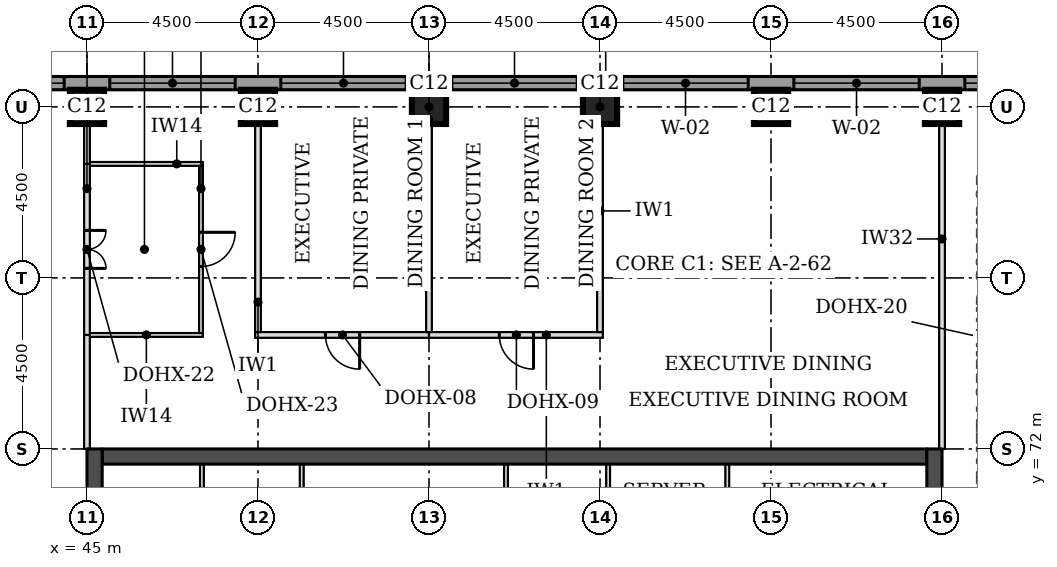
"""IFC4 building model, lengths in metres.
Left out: names, types, materials, properties, quantities, classifications, styles, units other than length and angle.
Written with IfcOpenShell. Run it as: python <this file> out.ifc"""

import sys

from ifc_helpers import new_model, si_unit, direction, frame, frame_2d, origin, origin_2d, place, context, subcontext, project, spatial, rectangle, extrude, element, fill, save


model = new_model("IFC4")
c1 = context("Model", 3, precision=1e-05, world=origin(), true_north=direction((0.0, 1.0)))
c2 = subcontext(c1, "Body", "Model", "MODEL_VIEW")
j1 = project(units=[si_unit("LENGTHUNIT", "METRE"), si_unit("PLANEANGLEUNIT", "RADIAN")], contexts=[c1])
p1 = place(None, origin())
s1 = spatial("IfcSite", under=j1, at=p1, CompositionType="ELEMENT")
p2 = place(p1, origin())
s2 = spatial("IfcBuilding", under=s1, at=p2, CompositionType="ELEMENT")
p3 = place(p2, frame((0.0, 0.0, 256.3)))
s3 = spatial("IfcBuildingStorey", under=s2, at=p3, CompositionType="ELEMENT", Elevation=256.3)
for number, where, z_axis, x_axis in (
    (1, (45.0, 81.0, 0.0), (0.0, 0.0, 1.0), (1.0, 0.0, 0.0)),
    (2, (49.5, 81.0, 0.0), (0.0, 0.0, 1.0), (1.0, 0.0, 0.0)),
    (3, (54.0, 81.0, 0.0), (0.0, 0.0, 1.0), (1.0, 0.0, 0.0)),
    (4, (58.5, 81.0, 0.0), (0.0, 0.0, 1.0), (1.0, 0.0, 0.0)),
    (5, (63.0, 81.0, 0.0), (0.0, 0.0, 1.0), (1.0, 0.0, 0.0)),
    (6, (67.5, 81.0, 0.0), (0.0, 0.0, 1.0), (1.0, 0.0, 0.0)),
):
    element("IfcColumn", number, at=place(p3, frame(where, z_axis=z_axis, x_axis=x_axis)), inside=s3, PredefinedType="COLUMN", context=c2, shape_type="SweptSolid", body=[
        extrude(rectangle(XDim=0.9, YDim=0.9, at=origin_2d()), origin(), (0.0, 0.0, 1.0), 3.7),
    ])
p4 = place(p3, frame((45.4, 71.8, 0.0), z_axis=(0.0, 0.0, 1.0), x_axis=(1.0, 0.0, 0.0)))
e7 = element("IfcWall", 7, at=p4, inside=s3, PredefinedType="SHEAR", context=c2, shape_type="SweptSolid", body=[
    extrude(rectangle(XDim=21.7, YDim=0.4, at=frame_2d((10.85, 0.0))), origin(), (0.0, 0.0, 1.0), 3.7),
])
p5 = place(p3, frame((45.2, 49.5, 0.0), z_axis=(0.0, 0.0, 1.0), x_axis=(0.0, 1.0, 0.0)))
e8 = element("IfcWall", 8, at=p5, inside=s3, PredefinedType="SHEAR", context=c2, shape_type="SweptSolid", body=[
    extrude(rectangle(XDim=22.5, YDim=0.4, at=frame_2d((11.25, 0.0))), origin(), (0.0, 0.0, 1.0), 3.7),
])
p6 = place(p5, frame((4.2, 0.0, 0.0)))
e9 = element("IfcOpeningElement", 9, at=p6, cuts=e8, PredefinedType="OPENING", context=c2, shape_type="SweptSolid", body=[
    extrude(rectangle(XDim=1.8, YDim=2.1, at=frame_2d((0.9, 1.05))), frame((0.0, 0.21, 0.0), z_axis=(0.0, -1.0, 0.0), x_axis=(1.0, 0.0, 0.0)), (0.0, 0.0, 1.0), 0.42),
])
p7 = place(p5, frame((6.9, 0.0, 0.0)))
e10 = element("IfcOpeningElement", 10, at=p7, cuts=e8, PredefinedType="OPENING", context=c2, shape_type="SweptSolid", body=[
    extrude(rectangle(XDim=1.1, YDim=2.1, at=frame_2d((0.55, 1.05))), frame((0.0, 0.21, 0.0), z_axis=(0.0, -1.0, 0.0), x_axis=(1.0, 0.0, 0.0)), (0.0, 0.0, 1.0), 0.42),
])
p8 = place(p5, frame((13.6, 0.0, 0.0)))
e11 = element("IfcOpeningElement", 11, at=p8, cuts=e8, PredefinedType="OPENING", context=c2, shape_type="SweptSolid", body=[
    extrude(rectangle(XDim=1.1, YDim=2.1, at=frame_2d((0.55, 1.05))), frame((0.0, 0.21, 0.0), z_axis=(0.0, -1.0, 0.0), x_axis=(1.0, 0.0, 0.0)), (0.0, 0.0, 1.0), 0.42),
])
p9 = place(p5, frame((16.5, 0.0, 0.0)))
e12 = element("IfcOpeningElement", 12, at=p9, cuts=e8, PredefinedType="OPENING", context=c2, shape_type="SweptSolid", body=[
    extrude(rectangle(XDim=1.8, YDim=2.1, at=frame_2d((0.9, 1.05))), frame((0.0, 0.21, 0.0), z_axis=(0.0, -1.0, 0.0), x_axis=(1.0, 0.0, 0.0)), (0.0, 0.0, 1.0), 0.42),
])
p10 = place(p3, frame((67.3, 49.5, 0.0), z_axis=(0.0, 0.0, 1.0), x_axis=(0.0, 1.0, 0.0)))
e13 = element("IfcWall", 13, at=p10, inside=s3, PredefinedType="SHEAR", context=c2, shape_type="SweptSolid", body=[
    extrude(rectangle(XDim=22.5, YDim=0.4, at=frame_2d((11.25, 0.0))), origin(), (0.0, 0.0, 1.0), 3.7),
])
p11 = place(p10, frame((4.2, 0.0, 0.0)))
e14 = element("IfcOpeningElement", 14, at=p11, cuts=e13, PredefinedType="OPENING", context=c2, shape_type="SweptSolid", body=[
    extrude(rectangle(XDim=1.8, YDim=2.1, at=frame_2d((0.9, 1.05))), frame((0.0, 0.21, 0.0), z_axis=(0.0, -1.0, 0.0), x_axis=(1.0, 0.0, 0.0)), (0.0, 0.0, 1.0), 0.42),
])
p12 = place(p10, frame((6.9, 0.0, 0.0)))
e15 = element("IfcOpeningElement", 15, at=p12, cuts=e13, PredefinedType="OPENING", context=c2, shape_type="SweptSolid", body=[
    extrude(rectangle(XDim=1.1, YDim=2.1, at=frame_2d((0.55, 1.05))), frame((0.0, 0.21, 0.0), z_axis=(0.0, -1.0, 0.0), x_axis=(1.0, 0.0, 0.0)), (0.0, 0.0, 1.0), 0.42),
])
p13 = place(p10, frame((13.6, 0.0, 0.0)))
e16 = element("IfcOpeningElement", 16, at=p13, cuts=e13, PredefinedType="OPENING", context=c2, shape_type="SweptSolid", body=[
    extrude(rectangle(XDim=1.1, YDim=2.1, at=frame_2d((0.55, 1.05))), frame((0.0, 0.21, 0.0), z_axis=(0.0, -1.0, 0.0), x_axis=(1.0, 0.0, 0.0)), (0.0, 0.0, 1.0), 0.42),
])
p14 = place(p10, frame((16.5, 0.0, 0.0)))
e17 = element("IfcOpeningElement", 17, at=p14, cuts=e13, PredefinedType="OPENING", context=c2, shape_type="SweptSolid", body=[
    extrude(rectangle(XDim=1.8, YDim=2.1, at=frame_2d((0.9, 1.05))), frame((0.0, 0.21, 0.0), z_axis=(0.0, -1.0, 0.0), x_axis=(1.0, 0.0, 0.0)), (0.0, 0.0, 1.0), 0.42),
])
p15 = place(p3, frame((72.331, 81.625, 0.0), z_axis=(0.0, 0.0, 1.0), x_axis=(-1.0, 0.0, 0.0)))
e18 = element("IfcWall", 18, at=p15, inside=s3, PredefinedType="STANDARD", context=c2, shape_type="SweptSolid", body=[
    extrude(rectangle(XDim=32.163, YDim=0.35, at=frame_2d((16.081, 0.0))), origin(), (0.0, 0.0, 1.0), 3.525),
])
p16 = place(p15, frame((0.931, 0.0, 0.9)))
e19 = element("IfcOpeningElement", 19, at=p16, cuts=e18, PredefinedType="OPENING", context=c2, shape_type="SweptSolid", body=[
    extrude(rectangle(XDim=3.3, YDim=1.9, at=frame_2d((1.65, 0.95))), frame((0.0, 0.185, 0.0), z_axis=(0.0, -1.0, 0.0), x_axis=(1.0, 0.0, 0.0)), (0.0, 0.0, 1.0), 0.37),
])
p17 = place(p15, frame((5.431, 0.0, 0.9)))
e20 = element("IfcOpeningElement", 20, at=p17, cuts=e18, PredefinedType="OPENING", context=c2, shape_type="SweptSolid", body=[
    extrude(rectangle(XDim=3.3, YDim=1.9, at=frame_2d((1.65, 0.95))), frame((0.0, 0.185, 0.0), z_axis=(0.0, -1.0, 0.0), x_axis=(1.0, 0.0, 0.0)), (0.0, 0.0, 1.0), 0.37),
])
p18 = place(p15, frame((9.931, 0.0, 0.9)))
e21 = element("IfcOpeningElement", 21, at=p18, cuts=e18, PredefinedType="OPENING", context=c2, shape_type="SweptSolid", body=[
    extrude(rectangle(XDim=3.3, YDim=1.9, at=frame_2d((1.65, 0.95))), frame((0.0, 0.185, 0.0), z_axis=(0.0, -1.0, 0.0), x_axis=(1.0, 0.0, 0.0)), (0.0, 0.0, 1.0), 0.37),
])
p19 = place(p15, frame((14.431, 0.0, 0.9)))
e22 = element("IfcOpeningElement", 22, at=p19, cuts=e18, PredefinedType="OPENING", context=c2, shape_type="SweptSolid", body=[
    extrude(rectangle(XDim=3.3, YDim=1.9, at=frame_2d((1.65, 0.95))), frame((0.0, 0.185, 0.0), z_axis=(0.0, -1.0, 0.0), x_axis=(1.0, 0.0, 0.0)), (0.0, 0.0, 1.0), 0.37),
])
p20 = place(p15, frame((18.931, 0.0, 0.9)))
e23 = element("IfcOpeningElement", 23, at=p20, cuts=e18, PredefinedType="OPENING", context=c2, shape_type="SweptSolid", body=[
    extrude(rectangle(XDim=3.3, YDim=1.9, at=frame_2d((1.65, 0.95))), frame((0.0, 0.185, 0.0), z_axis=(0.0, -1.0, 0.0), x_axis=(1.0, 0.0, 0.0)), (0.0, 0.0, 1.0), 0.37),
])
p21 = place(p15, frame((23.431, 0.0, 0.9)))
e24 = element("IfcOpeningElement", 24, at=p21, cuts=e18, PredefinedType="OPENING", context=c2, shape_type="SweptSolid", body=[
    extrude(rectangle(XDim=3.3, YDim=1.9, at=frame_2d((1.65, 0.95))), frame((0.0, 0.185, 0.0), z_axis=(0.0, -1.0, 0.0), x_axis=(1.0, 0.0, 0.0)), (0.0, 0.0, 1.0), 0.37),
])
p22 = place(p15, frame((27.931, 0.0, 0.9)))
e25 = element("IfcOpeningElement", 25, at=p22, cuts=e18, PredefinedType="OPENING", context=c2, shape_type="SweptSolid", body=[
    extrude(rectangle(XDim=3.3, YDim=1.9, at=frame_2d((1.65, 0.95))), frame((0.0, 0.185, 0.0), z_axis=(0.0, -1.0, 0.0), x_axis=(1.0, 0.0, 0.0)), (0.0, 0.0, 1.0), 0.37),
])
p23 = place(p3, frame((45.075, 75.0, 0.0), z_axis=(0.0, 0.0, 1.0), x_axis=(1.0, 0.0, 0.0)))
e26 = element("IfcWall", 26, at=p23, inside=s3, PredefinedType="PARTITIONING", context=c2, shape_type="SweptSolid", body=[
    extrude(rectangle(XDim=2.975, YDim=0.1, at=frame_2d((1.488, 0.0))), origin(), (0.0, 0.0, 1.0), 3.55),
])
p24 = place(p3, frame((49.425, 75.0, 0.0), z_axis=(0.0, 0.0, 1.0), x_axis=(1.0, 0.0, 0.0)))
e27 = element("IfcWall", 27, at=p24, inside=s3, PredefinedType="PARTITIONING", context=c2, shape_type="SweptSolid", body=[
    extrude(rectangle(XDim=4.575, YDim=0.15, at=frame_2d((2.288, 0.0))), origin(), (0.0, 0.0, 1.0), 3.55),
])
p25 = place(p24, frame((1.85, 0.0, 0.0)))
e28 = element("IfcOpeningElement", 28, at=p25, cuts=e27, PredefinedType="OPENING", context=c2, shape_type="SweptSolid", body=[
    extrude(rectangle(XDim=0.9, YDim=2.1, at=frame_2d((0.45, 1.05))), frame((0.0, 0.085, 0.0), z_axis=(0.0, -1.0, 0.0), x_axis=(1.0, 0.0, 0.0)), (0.0, 0.0, 1.0), 0.17),
])
p26 = place(p3, frame((54.0, 75.0, 0.0), z_axis=(0.0, 0.0, 1.0), x_axis=(1.0, 0.0, 0.0)))
e29 = element("IfcWall", 29, at=p26, inside=s3, PredefinedType="PARTITIONING", context=c2, shape_type="SweptSolid", body=[
    extrude(rectangle(XDim=4.575, YDim=0.15, at=frame_2d((2.288, 0.0))), origin(), (0.0, 0.0, 1.0), 3.55),
])
p27 = place(p26, frame((1.85, 0.0, 0.0)))
e30 = element("IfcOpeningElement", 30, at=p27, cuts=e29, PredefinedType="OPENING", context=c2, shape_type="SweptSolid", body=[
    extrude(rectangle(XDim=0.9, YDim=2.1, at=frame_2d((0.45, 1.05))), frame((0.0, 0.085, 0.0), z_axis=(0.0, -1.0, 0.0), x_axis=(1.0, 0.0, 0.0)), (0.0, 0.0, 1.0), 0.17),
])
p28 = place(p3, frame((45.075, 79.5, 0.0), z_axis=(0.0, 0.0, 1.0), x_axis=(1.0, 0.0, 0.0)))
e31 = element("IfcWall", 31, at=p28, inside=s3, PredefinedType="PARTITIONING", context=c2, shape_type="SweptSolid", body=[
    extrude(rectangle(XDim=2.975, YDim=0.1, at=frame_2d((1.488, 0.0))), origin(), (0.0, 0.0, 1.0), 3.55),
])
p29 = place(p3, frame((45.0, 72.0, 0.0), z_axis=(0.0, 0.0, 1.0), x_axis=(0.0, 1.0, 0.0)))
e32 = element("IfcWall", 32, at=p29, inside=s3, PredefinedType="PARTITIONING", context=c2, shape_type="SweptSolid", body=[
    extrude(rectangle(XDim=3.0, YDim=0.15, at=frame_2d((1.5, 0.0))), origin(), (0.0, 0.0, 1.0), 3.022),
])
p30 = place(p3, frame((67.5, 72.0, 0.0), z_axis=(0.0, 0.0, 1.0), x_axis=(0.0, 1.0, 0.0)))
e33 = element("IfcWall", 33, at=p30, inside=s3, PredefinedType="PARTITIONING", context=c2, shape_type="SweptSolid", body=[
    extrude(rectangle(XDim=9.45, YDim=0.15, at=frame_2d((4.725, 0.0))), origin(), (0.0, 0.0, 1.0), 3.022),
])
p31 = place(p3, frame((45.0, 75.0, 0.0), z_axis=(0.0, 0.0, 1.0), x_axis=(0.0, 1.0, 0.0)))
e34 = element("IfcWall", 34, at=p31, inside=s3, PredefinedType="PARTITIONING", context=c2, shape_type="SweptSolid", body=[
    extrude(rectangle(XDim=4.5, YDim=0.15, at=frame_2d((2.25, 0.0))), origin(), (0.0, 0.0, 1.0), 3.022),
])
p32 = place(p31, frame((1.75, 0.0, 0.0)))
e35 = element("IfcOpeningElement", 35, at=p32, cuts=e34, PredefinedType="OPENING", context=c2, shape_type="SweptSolid", body=[
    extrude(rectangle(XDim=1.0, YDim=2.1, at=frame_2d((0.5, 1.05))), frame((0.0, 0.085, 0.0), z_axis=(0.0, -1.0, 0.0), x_axis=(1.0, 0.0, 0.0)), (0.0, 0.0, 1.0), 0.17),
])
p33 = place(p3, frame((48.0, 75.05, 0.0), z_axis=(0.0, 0.0, 1.0), x_axis=(0.0, 1.0, 0.0)))
e36 = element("IfcWall", 36, at=p33, inside=s3, PredefinedType="PARTITIONING", context=c2, shape_type="SweptSolid", body=[
    extrude(rectangle(XDim=4.4, YDim=0.1, at=frame_2d((2.2, 0.0))), origin(), (0.0, 0.0, 1.0), 3.55),
])
p34 = place(p33, frame((1.75, 0.0, 0.0)))
e37 = element("IfcOpeningElement", 37, at=p34, cuts=e36, PredefinedType="OPENING", context=c2, shape_type="SweptSolid", body=[
    extrude(rectangle(XDim=0.9, YDim=2.1, at=frame_2d((0.45, 1.05))), frame((0.0, 0.06, 0.0), z_axis=(0.0, -1.0, 0.0), x_axis=(1.0, 0.0, 0.0)), (0.0, 0.0, 1.0), 0.12),
])
for number, where, z_axis, x_axis in (
    (38, (49.5, 75.075, 0.0), (0.0, 0.0, 1.0), (0.0, 1.0, 0.0)),
    (39, (54.0, 75.075, 0.0), (0.0, 0.0, 1.0), (0.0, 1.0, 0.0)),
    (40, (58.5, 75.075, 0.0), (0.0, 0.0, 1.0), (0.0, 1.0, 0.0)),
):
    element("IfcWall", number, at=place(p3, frame(where, z_axis=z_axis, x_axis=x_axis)), inside=s3, PredefinedType="PARTITIONING", context=c2, shape_type="SweptSolid", body=[
        extrude(rectangle(XDim=6.375, YDim=0.15, at=frame_2d((3.188, 0.0))), origin(), (0.0, 0.0, 1.0), 3.55),
    ])
p35 = place(p3, frame((45.0, 79.5, 0.0), z_axis=(0.0, 0.0, 1.0), x_axis=(0.0, 1.0, 0.0)))
e41 = element("IfcWall", 41, at=p35, inside=s3, PredefinedType="PARTITIONING", context=c2, shape_type="SweptSolid", body=[
    extrude(rectangle(XDim=1.95, YDim=0.15, at=frame_2d((0.975, 0.0))), origin(), (0.0, 0.0, 1.0), 3.022),
])
for number, where, z_axis, x_axis in (
    (42, (48.025, 68.5, 0.0), (0.0, 0.0, 1.0), (0.0, 1.0, 0.0)),
    (43, (50.65, 68.5, 0.0), (0.0, 0.0, 1.0), (0.0, 1.0, 0.0)),
    (44, (56.026, 68.5, 0.0), (0.0, 0.0, 1.0), (0.0, 1.0, 0.0)),
    (45, (58.714, 68.5, 0.0), (0.0, 0.0, 1.0), (0.0, 1.0, 0.0)),
    (46, (61.85, 68.5, 0.0), (0.0, 0.0, 1.0), (0.0, 1.0, 0.0)),
):
    element("IfcWall", number, at=place(p3, frame(where, z_axis=z_axis, x_axis=x_axis)), inside=s3, PredefinedType="PARTITIONING", context=c2, shape_type="SweptSolid", body=[
        extrude(rectangle(XDim=3.1, YDim=0.1, at=frame_2d((1.55, 0.0))), origin(), (0.0, 0.0, 1.0), 3.55),
    ])
p36 = place(p16, origin())
e47 = element("IfcWindow", 47, at=p36, inside=s3, PartitioningType="SINGLE_PANEL", PredefinedType="WINDOW", context=c2, shape_type="SweptSolid", body=[
    extrude(rectangle(XDim=3.3, YDim=1.9, at=frame_2d((1.65, 0.95))), frame((0.0, 0.085, 0.0), z_axis=(0.0, -1.0, 0.0), x_axis=(1.0, 0.0, 0.0)), (0.0, 0.0, 1.0), 0.06),
])
fill(e19, e47)
p37 = place(p17, origin())
e48 = element("IfcWindow", 48, at=p37, inside=s3, PartitioningType="SINGLE_PANEL", PredefinedType="WINDOW", context=c2, shape_type="SweptSolid", body=[
    extrude(rectangle(XDim=3.3, YDim=1.9, at=frame_2d((1.65, 0.95))), frame((0.0, 0.085, 0.0), z_axis=(0.0, -1.0, 0.0), x_axis=(1.0, 0.0, 0.0)), (0.0, 0.0, 1.0), 0.06),
])
fill(e20, e48)
p38 = place(p18, origin())
e49 = element("IfcWindow", 49, at=p38, inside=s3, PartitioningType="SINGLE_PANEL", PredefinedType="WINDOW", context=c2, shape_type="SweptSolid", body=[
    extrude(rectangle(XDim=3.3, YDim=1.9, at=frame_2d((1.65, 0.95))), frame((0.0, 0.085, 0.0), z_axis=(0.0, -1.0, 0.0), x_axis=(1.0, 0.0, 0.0)), (0.0, 0.0, 1.0), 0.06),
])
fill(e21, e49)
p39 = place(p19, origin())
e50 = element("IfcWindow", 50, at=p39, inside=s3, PartitioningType="SINGLE_PANEL", PredefinedType="WINDOW", context=c2, shape_type="SweptSolid", body=[
    extrude(rectangle(XDim=3.3, YDim=1.9, at=frame_2d((1.65, 0.95))), frame((0.0, 0.085, 0.0), z_axis=(0.0, -1.0, 0.0), x_axis=(1.0, 0.0, 0.0)), (0.0, 0.0, 1.0), 0.06),
])
fill(e22, e50)
p40 = place(p20, origin())
e51 = element("IfcWindow", 51, at=p40, inside=s3, PartitioningType="SINGLE_PANEL", PredefinedType="WINDOW", context=c2, shape_type="SweptSolid", body=[
    extrude(rectangle(XDim=3.3, YDim=1.9, at=frame_2d((1.65, 0.95))), frame((0.0, 0.085, 0.0), z_axis=(0.0, -1.0, 0.0), x_axis=(1.0, 0.0, 0.0)), (0.0, 0.0, 1.0), 0.06),
])
fill(e23, e51)
p41 = place(p21, origin())
e52 = element("IfcWindow", 52, at=p41, inside=s3, PartitioningType="SINGLE_PANEL", PredefinedType="WINDOW", context=c2, shape_type="SweptSolid", body=[
    extrude(rectangle(XDim=3.3, YDim=1.9, at=frame_2d((1.65, 0.95))), frame((0.0, 0.085, 0.0), z_axis=(0.0, -1.0, 0.0), x_axis=(1.0, 0.0, 0.0)), (0.0, 0.0, 1.0), 0.06),
])
fill(e24, e52)
p42 = place(p22, origin())
e53 = element("IfcWindow", 53, at=p42, inside=s3, PartitioningType="SINGLE_PANEL", PredefinedType="WINDOW", context=c2, shape_type="SweptSolid", body=[
    extrude(rectangle(XDim=3.3, YDim=1.9, at=frame_2d((1.65, 0.95))), frame((0.0, 0.085, 0.0), z_axis=(0.0, -1.0, 0.0), x_axis=(1.0, 0.0, 0.0)), (0.0, 0.0, 1.0), 0.06),
])
fill(e25, e53)
p43 = place(p32, frame((1.0, 0.0, 0.0), z_axis=(0.0, 0.0, 1.0), x_axis=(-1.0, 0.0, 0.0)))
e54 = element("IfcDoor", 54, at=p43, inside=s3, OperationType="DOUBLE_DOOR_SINGLE_SWING", PredefinedType="DOOR", context=c2, shape_type="SweptSolid", body=[
    extrude(rectangle(XDim=1.0, YDim=2.1, at=frame_2d((0.5, 1.05))), frame((0.0, 0.025, 0.0), z_axis=(0.0, -1.0, 0.0), x_axis=(1.0, 0.0, 0.0)), (0.0, 0.0, 1.0), 0.05),
])
fill(e35, e54)
p44 = place(p34, frame((0.9, 0.0, 0.0), z_axis=(0.0, 0.0, 1.0), x_axis=(-1.0, 0.0, 0.0)))
e55 = element("IfcDoor", 55, at=p44, inside=s3, OperationType="SINGLE_SWING_LEFT", PredefinedType="DOOR", context=c2, shape_type="SweptSolid", body=[
    extrude(rectangle(XDim=0.9, YDim=2.1, at=frame_2d((0.45, 1.05))), frame((0.0, 0.025, 0.0), z_axis=(0.0, -1.0, 0.0), x_axis=(1.0, 0.0, 0.0)), (0.0, 0.0, 1.0), 0.05),
])
fill(e37, e55)
p45 = place(p25, frame((0.9, 0.0, 0.0), z_axis=(0.0, 0.0, 1.0), x_axis=(-1.0, 0.0, 0.0)))
e56 = element("IfcDoor", 56, at=p45, inside=s3, OperationType="SINGLE_SWING_LEFT", PredefinedType="DOOR", context=c2, shape_type="SweptSolid", body=[
    extrude(rectangle(XDim=0.9, YDim=2.1, at=frame_2d((0.45, 1.05))), frame((0.0, 0.025, 0.0), z_axis=(0.0, -1.0, 0.0), x_axis=(1.0, 0.0, 0.0)), (0.0, 0.0, 1.0), 0.05),
])
fill(e28, e56)
p46 = place(p27, frame((0.9, 0.0, 0.0), z_axis=(0.0, 0.0, 1.0), x_axis=(-1.0, 0.0, 0.0)))
e57 = element("IfcDoor", 57, at=p46, inside=s3, OperationType="SINGLE_SWING_LEFT", PredefinedType="DOOR", context=c2, shape_type="SweptSolid", body=[
    extrude(rectangle(XDim=0.9, YDim=2.1, at=frame_2d((0.45, 1.05))), frame((0.0, 0.025, 0.0), z_axis=(0.0, -1.0, 0.0), x_axis=(1.0, 0.0, 0.0)), (0.0, 0.0, 1.0), 0.05),
])
fill(e30, e57)
save(model, sys.argv[1])
